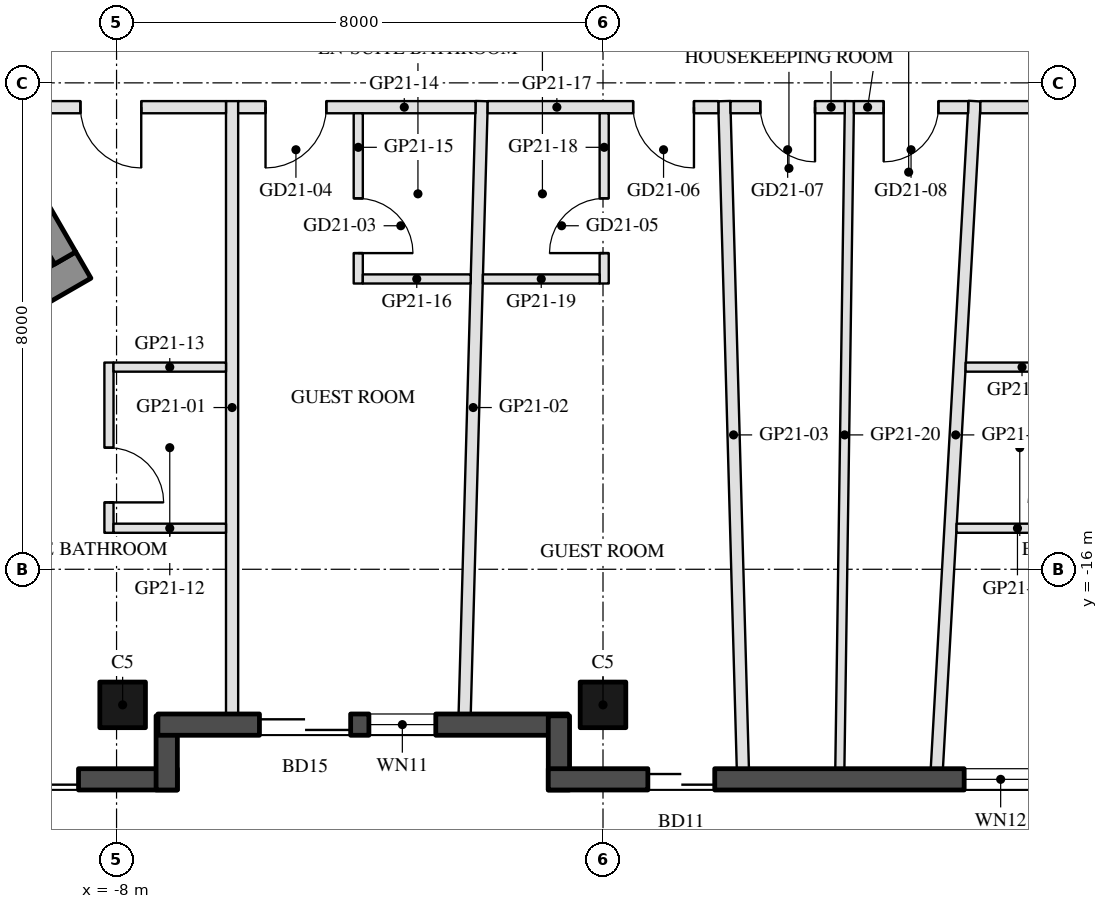
"""IFC4 building model, lengths in metres.
Left out: names, types, materials, properties, quantities, classifications, styles, units other than length and angle.
Written with IfcOpenShell. Run it as: python <this file> out.ifc"""

import sys

from ifc_helpers import new_model, si_unit, direction, frame, frame_2d, origin, origin_2d, place, context, subcontext, project, spatial, rectangle, hollow_rectangle, extrude, element, fill, save


model = new_model("IFC4")
c1 = context("Model", 3, precision=1e-05, world=origin(), true_north=direction((0.0, 1.0)))
c2 = subcontext(c1, "Body", "Model", "MODEL_VIEW")
j1 = project(units=[si_unit("LENGTHUNIT", "METRE"), si_unit("PLANEANGLEUNIT", "RADIAN")], contexts=[c1])
p1 = place(None, origin())
s1 = spatial("IfcSite", under=j1, at=p1, CompositionType="ELEMENT")
p2 = place(p1, origin())
s2 = spatial("IfcBuilding", under=s1, at=p2, CompositionType="ELEMENT")
p3 = place(p2, frame((0.0, 0.0, 216.9)))
s3 = spatial("IfcBuildingStorey", under=s2, at=p3, CompositionType="ELEMENT", Elevation=216.9)
for number, where, z_axis, x_axis in (
    (1, (-7.9, -18.23, 0.0), (0.0, 0.0, 1.0), (-1.0, 0.0, 0.0)),
    (2, (0.0, -18.23, 0.0), (0.0, 0.0, 1.0), (-1.0, 0.0, 0.0)),
):
    element("IfcColumn", number, at=place(p3, frame(where, z_axis=z_axis, x_axis=x_axis)), inside=s3, PredefinedType="COLUMN", context=c2, shape_type="SweptSolid", body=[
        extrude(hollow_rectangle(XDim=0.75, YDim=0.75, WallThickness=0.035, at=origin_2d()), origin(), (0.0, 0.0, 1.0), 3.7),
    ])
p4 = place(p3, frame((-18.816, -19.455, 0.0), z_axis=(0.0, 0.0, 1.0), x_axis=(1.0, 0.0, 0.0)))
e3 = element("IfcWall", 3, at=p4, inside=s3, PredefinedType="SOLIDWALL", context=c2, shape_type="SweptSolid", body=[
    extrude(rectangle(XDim=11.816, YDim=0.35, at=frame_2d((5.908, 0.0))), origin(), (0.0, 0.0, 1.0), 3.55),
])
p5 = place(p4, frame((0.381, 0.0, 0.3)))
e4 = element("IfcOpeningElement", 4, at=p5, cuts=e3, PredefinedType="OPENING", context=c2, shape_type="SweptSolid", body=[
    extrude(rectangle(XDim=1.9, YDim=2.65, at=frame_2d((0.95, 1.325))), frame((0.0, 0.185, 0.0), z_axis=(0.0, -1.0, 0.0), x_axis=(1.0, 0.0, 0.0)), (0.0, 0.0, 1.0), 0.37),
])
p6 = place(p4, frame((7.79, 0.0, 0.0)))
e5 = element("IfcOpeningElement", 5, at=p6, cuts=e3, PredefinedType="OPENING", context=c2, shape_type="SweptSolid", body=[
    extrude(rectangle(XDim=2.4, YDim=2.4, at=frame_2d((1.2, 1.2))), frame((0.0, 0.185, 0.0), z_axis=(0.0, -1.0, 0.0), x_axis=(1.0, 0.0, 0.0)), (0.0, 0.0, 1.0), 0.37),
])
p7 = place(p4, frame((3.741, 0.0, 0.3)))
e6 = element("IfcOpeningElement", 6, at=p7, cuts=e3, PredefinedType="OPENING", context=c2, shape_type="SweptSolid", body=[
    extrude(rectangle(XDim=1.7, YDim=2.65, at=frame_2d((0.85, 1.325))), frame((0.0, 0.185, 0.0), z_axis=(0.0, -1.0, 0.0), x_axis=(1.0, 0.0, 0.0)), (0.0, 0.0, 1.0), 0.37),
])
p8 = place(p4, frame((5.741, 0.0, 0.3)))
e7 = element("IfcOpeningElement", 7, at=p8, cuts=e3, PredefinedType="OPENING", context=c2, shape_type="SweptSolid", body=[
    extrude(rectangle(XDim=1.7, YDim=2.65, at=frame_2d((0.85, 1.325))), frame((0.0, 0.185, 0.0), z_axis=(0.0, -1.0, 0.0), x_axis=(1.0, 0.0, 0.0)), (0.0, 0.0, 1.0), 0.37),
])
p9 = place(p3, frame((-7.175, -19.63, 0.0), z_axis=(0.0, 0.0, 1.0), x_axis=(0.0, 1.0, 0.0)))
e8 = element("IfcWall", 8, at=p9, inside=s3, PredefinedType="SOLIDWALL", context=c2, shape_type="SweptSolid", body=[
    extrude(rectangle(XDim=1.22, YDim=0.35, at=frame_2d((0.61, 0.0))), origin(), (0.0, 0.0, 1.0), 3.55),
])
p10 = place(p3, frame((-7.32, -18.555, 0.0), z_axis=(0.0, 0.0, 1.0), x_axis=(1.0, 0.0, 0.0)))
e9 = element("IfcWall", 9, at=p10, inside=s3, PredefinedType="SOLIDWALL", context=c2, shape_type="SweptSolid", body=[
    extrude(rectangle(XDim=6.74, YDim=0.35, at=frame_2d((3.37, 0.0))), origin(), (0.0, 0.0, 1.0), 3.55),
])
p11 = place(p10, frame((1.67, 0.0, 0.0)))
e10 = element("IfcOpeningElement", 10, at=p11, cuts=e9, PredefinedType="OPENING", context=c2, shape_type="SweptSolid", body=[
    extrude(rectangle(XDim=1.5, YDim=2.4, at=frame_2d((0.75, 1.2))), frame((0.0, 0.185, 0.0), z_axis=(0.0, -1.0, 0.0), x_axis=(1.0, 0.0, 0.0)), (0.0, 0.0, 1.0), 0.37),
])
p12 = place(p10, frame((3.47, 0.0, 0.3)))
e11 = element("IfcOpeningElement", 11, at=p12, cuts=e9, PredefinedType="OPENING", context=c2, shape_type="SweptSolid", body=[
    extrude(rectangle(XDim=1.1, YDim=2.65, at=frame_2d((0.55, 1.325))), frame((0.0, 0.185, 0.0), z_axis=(0.0, -1.0, 0.0), x_axis=(1.0, 0.0, 0.0)), (0.0, 0.0, 1.0), 0.37),
])
p13 = place(p3, frame((-0.725, -18.41, 0.0), z_axis=(0.0, 0.0, 1.0), x_axis=(0.0, -1.0, 0.0)))
e12 = element("IfcWall", 12, at=p13, inside=s3, PredefinedType="SOLIDWALL", context=c2, shape_type="SweptSolid", body=[
    extrude(rectangle(XDim=1.22, YDim=0.35, at=frame_2d((0.61, 0.0))), origin(), (0.0, 0.0, 1.0), 3.55),
])
p14 = place(p3, frame((-0.9, -19.455, 0.0), z_axis=(0.0, 0.0, 1.0), x_axis=(1.0, 0.0, 0.0)))
e13 = element("IfcWall", 13, at=p14, inside=s3, PredefinedType="SOLIDWALL", context=c2, shape_type="SweptSolid", body=[
    extrude(rectangle(XDim=9.7, YDim=0.35, at=frame_2d((4.85, 0.0))), origin(), (0.0, 0.0, 1.0), 3.55),
])
p15 = place(p14, frame((1.638, 0.0, 0.0)))
e14 = element("IfcOpeningElement", 14, at=p15, cuts=e13, PredefinedType="OPENING", context=c2, shape_type="SweptSolid", body=[
    extrude(rectangle(XDim=1.1, YDim=2.4, at=frame_2d((0.55, 1.2))), frame((0.0, 0.185, 0.0), z_axis=(0.0, -1.0, 0.0), x_axis=(1.0, 0.0, 0.0)), (0.0, 0.0, 1.0), 0.37),
])
p16 = place(p14, frame((6.84, 0.0, 0.3)))
e15 = element("IfcOpeningElement", 15, at=p16, cuts=e13, PredefinedType="OPENING", context=c2, shape_type="SweptSolid", body=[
    extrude(rectangle(XDim=1.2, YDim=2.65, at=frame_2d((0.6, 1.325))), frame((0.0, 0.185, 0.0), z_axis=(0.0, -1.0, 0.0), x_axis=(1.0, 0.0, 0.0)), (0.0, 0.0, 1.0), 0.37),
])
p17 = place(p3, frame((-8.547, -10.997, 0.0), z_axis=(0.0, 0.0, 1.0), x_axis=(-0.866025009528, -0.500000682871, 0.0)))
e16 = element("IfcWall", 16, at=p17, inside=s3, PredefinedType="SHEAR", context=c2, shape_type="SweptSolid", body=[
    extrude(rectangle(XDim=14.837, YDim=0.5, at=frame_2d((7.418, 0.0))), origin(), (0.0, 0.0, 1.0), 3.5),
])
p18 = place(p3, frame((-13.845, -2.22, 0.0), z_axis=(0.0, 0.0, 1.0), x_axis=(0.500004234368, -0.866022959057, 0.0)))
e17 = element("IfcWall", 17, at=p18, inside=s3, PredefinedType="SHEAR", context=c2, shape_type="SweptSolid", body=[
    extrude(rectangle(XDim=10.0, YDim=0.4, at=frame_2d((5.0, 0.0))), origin(), (0.0, 0.0, 1.0), 3.5),
])
p19 = place(p18, frame((3.55, 0.0, 0.0)))
e18 = element("IfcOpeningElement", 18, at=p19, cuts=e17, PredefinedType="OPENING", context=c2, shape_type="SweptSolid", body=[
    extrude(rectangle(XDim=1.1, YDim=2.1, at=frame_2d((0.55, 1.05))), frame((0.0, 0.21, 0.0), z_axis=(0.0, -1.0, 0.0), x_axis=(1.0, 0.0, 0.0)), (0.0, 0.0, 1.0), 0.42),
])
p20 = place(p18, frame((5.85, 0.0, 0.0)))
e19 = element("IfcOpeningElement", 19, at=p20, cuts=e17, PredefinedType="OPENING", context=c2, shape_type="SweptSolid", body=[
    extrude(rectangle(XDim=1.4, YDim=2.1, at=frame_2d((0.7, 1.05))), frame((0.0, 0.21, 0.0), z_axis=(0.0, -1.0, 0.0), x_axis=(1.0, 0.0, 0.0)), (0.0, 0.0, 1.0), 0.42),
])
p21 = place(p3, frame((-6.1, -18.38, 0.0), z_axis=(0.0, 0.0, 1.0), x_axis=(0.0, 1.0, 0.0)))
e20 = element("IfcWall", 20, at=p21, inside=s3, PredefinedType="PARTITIONING", context=c2, shape_type="SweptSolid", body=[
    extrude(rectangle(XDim=10.08, YDim=0.2, at=frame_2d((5.04, 0.0))), origin(), (0.0, 0.0, 1.0), 3.06),
])
p22 = place(p3, frame((-2.275, -18.38, 0.0), z_axis=(0.0, 0.0, 1.0), x_axis=(0.027818812611, 0.999612981941, 0.0)))
e21 = element("IfcWall", 21, at=p22, inside=s3, PredefinedType="PARTITIONING", context=c2, shape_type="SweptSolid", body=[
    extrude(rectangle(XDim=10.084, YDim=0.2, at=frame_2d((5.042, 0.0))), origin(), (0.0, 0.0, 1.0), 3.06),
])
p23 = place(p3, frame((2.3, -19.28, 0.0), z_axis=(0.0, 0.0, 1.0), x_axis=(-0.027827525898, 0.999612739416, 0.0)))
e22 = element("IfcWall", 22, at=p23, inside=s3, PredefinedType="PARTITIONING", context=c2, shape_type="SweptSolid", body=[
    extrude(rectangle(XDim=10.984, YDim=0.2, at=frame_2d((5.492, 0.0))), origin(), (0.0, 0.0, 1.0), 3.06),
])
p24 = place(p3, frame((5.49, -19.28, 0.0), z_axis=(0.0, 0.0, 1.0), x_axis=(0.056497863711, 0.998402720046, 0.0)))
e23 = element("IfcWall", 23, at=p24, inside=s3, PredefinedType="PARTITIONING", context=c2, shape_type="SweptSolid", body=[
    extrude(rectangle(XDim=10.998, YDim=0.2, at=frame_2d((5.499, 0.0))), origin(), (0.0, 0.0, 1.0), 3.06),
])
p25 = place(p3, frame((-6.2, -8.4, 0.0), z_axis=(0.0, 0.0, 1.0), x_axis=(-1.0, 0.0, 0.0)))
e24 = element("IfcWall", 24, at=p25, inside=s3, PredefinedType="PARTITIONING", context=c2, shape_type="SweptSolid", body=[
    extrude(rectangle(XDim=3.788, YDim=0.2, at=frame_2d((1.894, 0.0))), origin(), (0.0, 0.0, 1.0), 2.95),
])
p26 = place(p25, frame((1.394, 0.0, 0.0)))
e25 = element("IfcOpeningElement", 25, at=p26, cuts=e24, PredefinedType="OPENING", context=c2, shape_type="SweptSolid", body=[
    extrude(rectangle(XDim=1.0, YDim=2.1, at=frame_2d((0.5, 1.05))), frame((0.0, 0.11, 0.0), z_axis=(0.0, -1.0, 0.0), x_axis=(1.0, 0.0, 0.0)), (0.0, 0.0, 1.0), 0.22),
])
p27 = place(p3, frame((-8.125, -12.6, 0.0), z_axis=(0.0, 0.0, 1.0), x_axis=(0.0, -1.0, 0.0)))
e26 = element("IfcWall", 26, at=p27, inside=s3, PredefinedType="PARTITIONING", context=c2, shape_type="SweptSolid", body=[
    extrude(rectangle(XDim=2.8, YDim=0.15, at=frame_2d((1.4, 0.0))), origin(), (0.0, 0.0, 1.0), 3.55),
])
p28 = place(p27, frame((1.4, 0.0, 0.0)))
e27 = element("IfcOpeningElement", 27, at=p28, cuts=e26, PredefinedType="OPENING", context=c2, shape_type="SweptSolid", body=[
    extrude(rectangle(XDim=0.9, YDim=2.1, at=frame_2d((0.45, 1.05))), frame((0.0, 0.085, 0.0), z_axis=(0.0, -1.0, 0.0), x_axis=(1.0, 0.0, 0.0)), (0.0, 0.0, 1.0), 0.17),
])
for number, where, z_axis, x_axis in (
    (28, (-8.05, -15.325, 0.0), (0.0, 0.0, 1.0), (1.0, 0.0, 0.0)),
    (29, (-8.05, -12.675, 0.0), (0.0, 0.0, 1.0), (1.0, 0.0, 0.0)),
):
    element("IfcWall", number, at=place(p3, frame(where, z_axis=z_axis, x_axis=x_axis)), inside=s3, PredefinedType="PARTITIONING", context=c2, shape_type="SweptSolid", body=[
        extrude(rectangle(XDim=1.85, YDim=0.15, at=frame_2d((0.925, 0.0))), origin(), (0.0, 0.0, 1.0), 2.95),
    ])
p29 = place(p3, frame((-2.097, -8.4, 0.0), z_axis=(0.0, 0.0, 1.0), x_axis=(-1.0, 0.0, 0.0)))
e30 = element("IfcWall", 30, at=p29, inside=s3, PredefinedType="PARTITIONING", context=c2, shape_type="SweptSolid", body=[
    extrude(rectangle(XDim=3.903, YDim=0.2, at=frame_2d((1.951, 0.0))), origin(), (0.0, 0.0, 1.0), 2.95),
])
p30 = place(p29, frame((2.453, 0.0, 0.0)))
e31 = element("IfcOpeningElement", 31, at=p30, cuts=e30, PredefinedType="OPENING", context=c2, shape_type="SweptSolid", body=[
    extrude(rectangle(XDim=1.0, YDim=2.1, at=frame_2d((0.5, 1.05))), frame((0.0, 0.11, 0.0), z_axis=(0.0, -1.0, 0.0), x_axis=(1.0, 0.0, 0.0)), (0.0, 0.0, 1.0), 0.22),
])
p31 = place(p3, frame((-4.025, -8.5, 0.0), z_axis=(0.0, 0.0, 1.0), x_axis=(0.0, -1.0, 0.0)))
e32 = element("IfcWall", 32, at=p31, inside=s3, PredefinedType="PARTITIONING", context=c2, shape_type="SweptSolid", body=[
    extrude(rectangle(XDim=2.8, YDim=0.15, at=frame_2d((1.4, 0.0))), origin(), (0.0, 0.0, 1.0), 2.95),
])
p32 = place(p31, frame((1.4, 0.0, 0.0)))
e33 = element("IfcOpeningElement", 33, at=p32, cuts=e32, PredefinedType="OPENING", context=c2, shape_type="SweptSolid", body=[
    extrude(rectangle(XDim=0.9, YDim=2.1, at=frame_2d((0.45, 1.05))), frame((0.0, 0.085, 0.0), z_axis=(0.0, -1.0, 0.0), x_axis=(1.0, 0.0, 0.0)), (0.0, 0.0, 1.0), 0.17),
])
p33 = place(p3, frame((-3.95, -11.225, 0.0), z_axis=(0.0, 0.0, 1.0), x_axis=(1.0, 0.0, 0.0)))
e34 = element("IfcWall", 34, at=p33, inside=s3, PredefinedType="PARTITIONING", context=c2, shape_type="SweptSolid", body=[
    extrude(rectangle(XDim=1.774, YDim=0.15, at=frame_2d((0.887, 0.0))), origin(), (0.0, 0.0, 1.0), 2.95),
])
p34 = place(p3, frame((1.897, -8.4, 0.0), z_axis=(0.0, 0.0, 1.0), x_axis=(-1.0, 0.0, 0.0)))
e35 = element("IfcWall", 35, at=p34, inside=s3, PredefinedType="PARTITIONING", context=c2, shape_type="SweptSolid", body=[
    extrude(rectangle(XDim=3.794, YDim=0.2, at=frame_2d((1.897, 0.0))), origin(), (0.0, 0.0, 1.0), 2.95),
])
p35 = place(p34, frame((0.401, 0.0, 0.0)))
e36 = element("IfcOpeningElement", 36, at=p35, cuts=e35, PredefinedType="OPENING", context=c2, shape_type="SweptSolid", body=[
    extrude(rectangle(XDim=1.0, YDim=2.1, at=frame_2d((0.5, 1.05))), frame((0.0, 0.11, 0.0), z_axis=(0.0, -1.0, 0.0), x_axis=(1.0, 0.0, 0.0)), (0.0, 0.0, 1.0), 0.22),
])
p36 = place(p3, frame((0.019, -11.3, 0.0), z_axis=(0.0, 0.0, 1.0), x_axis=(0.0, 1.0, 0.0)))
e37 = element("IfcWall", 37, at=p36, inside=s3, PredefinedType="PARTITIONING", context=c2, shape_type="SweptSolid", body=[
    extrude(rectangle(XDim=2.8, YDim=0.15, at=frame_2d((1.4, 0.0))), origin(), (0.0, 0.0, 1.0), 2.95),
])
p37 = place(p36, frame((0.5, 0.0, 0.0)))
e38 = element("IfcOpeningElement", 38, at=p37, cuts=e37, PredefinedType="OPENING", context=c2, shape_type="SweptSolid", body=[
    extrude(rectangle(XDim=0.9, YDim=2.1, at=frame_2d((0.45, 1.05))), frame((0.0, 0.085, 0.0), z_axis=(0.0, -1.0, 0.0), x_axis=(1.0, 0.0, 0.0)), (0.0, 0.0, 1.0), 0.17),
])
p38 = place(p3, frame((-1.976, -11.225, 0.0), z_axis=(0.0, 0.0, 1.0), x_axis=(1.0, 0.0, 0.0)))
e39 = element("IfcWall", 39, at=p38, inside=s3, PredefinedType="PARTITIONING", context=c2, shape_type="SweptSolid", body=[
    extrude(rectangle(XDim=1.92, YDim=0.15, at=frame_2d((0.96, 0.0))), origin(), (0.0, 0.0, 1.0), 2.95),
])
p39 = place(p3, frame((3.895, -19.28, 0.0), z_axis=(0.0, 0.0, 1.0), x_axis=(0.014384601302, 0.99989653627, 0.0)))
e40 = element("IfcWall", 40, at=p39, inside=s3, PredefinedType="PARTITIONING", context=c2, shape_type="SweptSolid", body=[
    extrude(rectangle(XDim=10.981, YDim=0.15, at=frame_2d((5.491, 0.0))), origin(), (0.0, 0.0, 1.0), 2.95),
])
p40 = place(p3, frame((3.976, -8.4, 0.0), z_axis=(0.0, 0.0, 1.0), x_axis=(-1.0, 0.0, 0.0)))
e41 = element("IfcWall", 41, at=p40, inside=s3, PredefinedType="PARTITIONING", context=c2, shape_type="SweptSolid", body=[
    extrude(rectangle(XDim=1.879, YDim=0.2, at=frame_2d((0.939, 0.0))), origin(), (0.0, 0.0, 1.0), 2.95),
])
p41 = place(p40, frame((0.49, 0.0, 0.0)))
e42 = element("IfcOpeningElement", 42, at=p41, cuts=e41, PredefinedType="OPENING", context=c2, shape_type="SweptSolid", body=[
    extrude(rectangle(XDim=0.9, YDim=2.1, at=frame_2d((0.45, 1.05))), frame((0.0, 0.11, 0.0), z_axis=(0.0, -1.0, 0.0), x_axis=(1.0, 0.0, 0.0)), (0.0, 0.0, 1.0), 0.22),
])
p42 = place(p3, frame((6.006, -8.4, 0.0), z_axis=(0.0, 0.0, 1.0), x_axis=(-1.0, 0.0, 0.0)))
e43 = element("IfcWall", 43, at=p42, inside=s3, PredefinedType="PARTITIONING", context=c2, shape_type="SweptSolid", body=[
    extrude(rectangle(XDim=1.879, YDim=0.2, at=frame_2d((0.939, 0.0))), origin(), (0.0, 0.0, 1.0), 3.55),
])
p43 = place(p42, frame((0.49, 0.0, 0.0)))
e44 = element("IfcOpeningElement", 44, at=p43, cuts=e43, PredefinedType="OPENING", context=c2, shape_type="SweptSolid", body=[
    extrude(rectangle(XDim=0.9, YDim=2.1, at=frame_2d((0.45, 1.05))), frame((0.0, 0.11, 0.0), z_axis=(0.0, -1.0, 0.0), x_axis=(1.0, 0.0, 0.0)), (0.0, 0.0, 1.0), 0.22),
])
p44 = place(p3, frame((9.988, -8.4, 0.0), z_axis=(0.0, 0.0, 1.0), x_axis=(-1.0, 0.0, 0.0)))
e45 = element("IfcWall", 45, at=p44, inside=s3, PredefinedType="PARTITIONING", context=c2, shape_type="SweptSolid", body=[
    extrude(rectangle(XDim=3.782, YDim=0.2, at=frame_2d((1.891, 0.0))), origin(), (0.0, 0.0, 1.0), 2.95),
])
p45 = place(p44, frame((1.391, 0.0, 0.0)))
e46 = element("IfcOpeningElement", 46, at=p45, cuts=e45, PredefinedType="OPENING", context=c2, shape_type="SweptSolid", body=[
    extrude(rectangle(XDim=1.0, YDim=2.1, at=frame_2d((0.5, 1.05))), frame((0.0, 0.11, 0.0), z_axis=(0.0, -1.0, 0.0), x_axis=(1.0, 0.0, 0.0)), (0.0, 0.0, 1.0), 0.22),
])
p46 = place(p3, frame((5.814, -15.325, 0.0), z_axis=(0.0, 0.0, 1.0), x_axis=(1.0, 0.0, 0.0)))
e47 = element("IfcWall", 47, at=p46, inside=s3, PredefinedType="PARTITIONING", context=c2, shape_type="SweptSolid", body=[
    extrude(rectangle(XDim=2.004, YDim=0.15, at=frame_2d((1.002, 0.0))), origin(), (0.0, 0.0, 1.0), 2.95),
])
p47 = place(p3, frame((5.964, -12.675, 0.0), z_axis=(0.0, 0.0, 1.0), x_axis=(1.0, 0.0, 0.0)))
e48 = element("IfcWall", 48, at=p47, inside=s3, PredefinedType="PARTITIONING", context=c2, shape_type="SweptSolid", body=[
    extrude(rectangle(XDim=1.854, YDim=0.15, at=frame_2d((0.927, 0.0))), origin(), (0.0, 0.0, 1.0), 2.95),
])
p48 = place(p6, frame((2.4, 0.0, 0.0), z_axis=(0.0, 0.0, 1.0), x_axis=(-1.0, 0.0, 0.0)))
e49 = element("IfcDoor", 49, at=p48, inside=s3, OperationType="SLIDING_TO_LEFT", PredefinedType="DOOR", context=c2, shape_type="SweptSolid", body=[
    extrude(rectangle(XDim=2.4, YDim=2.4, at=frame_2d((1.2, 1.2))), frame((0.0, 0.025, 0.0), z_axis=(0.0, -1.0, 0.0), x_axis=(1.0, 0.0, 0.0)), (0.0, 0.0, 1.0), 0.05),
])
fill(e5, e49)
p49 = place(p11, frame((1.5, 0.0, 0.0), z_axis=(0.0, 0.0, 1.0), x_axis=(-1.0, 0.0, 0.0)))
e50 = element("IfcDoor", 50, at=p49, inside=s3, OperationType="SLIDING_TO_LEFT", PredefinedType="DOOR", context=c2, shape_type="SweptSolid", body=[
    extrude(rectangle(XDim=1.5, YDim=2.4, at=frame_2d((0.75, 1.2))), frame((0.0, 0.025, 0.0), z_axis=(0.0, -1.0, 0.0), x_axis=(1.0, 0.0, 0.0)), (0.0, 0.0, 1.0), 0.05),
])
fill(e10, e50)
p50 = place(p12, origin())
e51 = element("IfcWindow", 51, at=p50, inside=s3, PartitioningType="SINGLE_PANEL", PredefinedType="WINDOW", context=c2, shape_type="SweptSolid", body=[
    extrude(rectangle(XDim=1.1, YDim=2.65, at=frame_2d((0.55, 1.325))), frame((0.0, 0.03, 0.0), z_axis=(0.0, -1.0, 0.0), x_axis=(1.0, 0.0, 0.0)), (0.0, 0.0, 1.0), 0.06),
])
fill(e11, e51)
p51 = place(p15, frame((1.1, 0.0, 0.0), z_axis=(0.0, 0.0, 1.0), x_axis=(-1.0, 0.0, 0.0)))
e52 = element("IfcDoor", 52, at=p51, inside=s3, OperationType="SLIDING_TO_LEFT", PredefinedType="DOOR", context=c2, shape_type="SweptSolid", body=[
    extrude(rectangle(XDim=1.1, YDim=2.4, at=frame_2d((0.55, 1.2))), frame((0.0, 0.025, 0.0), z_axis=(0.0, -1.0, 0.0), x_axis=(1.0, 0.0, 0.0)), (0.0, 0.0, 1.0), 0.05),
])
fill(e14, e52)
p52 = place(p16, origin())
e53 = element("IfcWindow", 53, at=p52, inside=s3, PartitioningType="SINGLE_PANEL", PredefinedType="WINDOW", context=c2, shape_type="SweptSolid", body=[
    extrude(rectangle(XDim=1.2, YDim=2.65, at=frame_2d((0.6, 1.325))), frame((0.0, 0.03, 0.0), z_axis=(0.0, -1.0, 0.0), x_axis=(1.0, 0.0, 0.0)), (0.0, 0.0, 1.0), 0.06),
])
fill(e15, e53)
p53 = place(p28, origin())
e54 = element("IfcDoor", 54, at=p53, inside=s3, OperationType="SINGLE_SWING_RIGHT", PredefinedType="DOOR", context=c2, shape_type="SweptSolid", body=[
    extrude(rectangle(XDim=0.9, YDim=2.1, at=frame_2d((0.45, 1.05))), frame((0.0, 0.025, 0.0), z_axis=(0.0, -1.0, 0.0), x_axis=(1.0, 0.0, 0.0)), (0.0, 0.0, 1.0), 0.05),
])
fill(e27, e54)
p54 = place(p26, origin())
e55 = element("IfcDoor", 55, at=p54, inside=s3, OperationType="SINGLE_SWING_LEFT", PredefinedType="DOOR", context=c2, shape_type="SweptSolid", body=[
    extrude(rectangle(XDim=1.0, YDim=2.1, at=frame_2d((0.5, 1.05))), frame((0.0, 0.025, 0.0), z_axis=(0.0, -1.0, 0.0), x_axis=(1.0, 0.0, 0.0)), (0.0, 0.0, 1.0), 0.05),
])
fill(e25, e55)
p55 = place(p32, origin())
e56 = element("IfcDoor", 56, at=p55, inside=s3, OperationType="SINGLE_SWING_RIGHT", PredefinedType="DOOR", context=c2, shape_type="SweptSolid", body=[
    extrude(rectangle(XDim=0.9, YDim=2.1, at=frame_2d((0.45, 1.05))), frame((0.0, 0.025, 0.0), z_axis=(0.0, -1.0, 0.0), x_axis=(1.0, 0.0, 0.0)), (0.0, 0.0, 1.0), 0.05),
])
fill(e33, e56)
p56 = place(p30, origin())
e57 = element("IfcDoor", 57, at=p56, inside=s3, OperationType="SINGLE_SWING_RIGHT", PredefinedType="DOOR", context=c2, shape_type="SweptSolid", body=[
    extrude(rectangle(XDim=1.0, YDim=2.1, at=frame_2d((0.5, 1.05))), frame((0.0, 0.025, 0.0), z_axis=(0.0, -1.0, 0.0), x_axis=(1.0, 0.0, 0.0)), (0.0, 0.0, 1.0), 0.05),
])
fill(e31, e57)
p57 = place(p37, origin())
e58 = element("IfcDoor", 58, at=p57, inside=s3, OperationType="SINGLE_SWING_LEFT", PredefinedType="DOOR", context=c2, shape_type="SweptSolid", body=[
    extrude(rectangle(XDim=0.9, YDim=2.1, at=frame_2d((0.45, 1.05))), frame((0.0, 0.025, 0.0), z_axis=(0.0, -1.0, 0.0), x_axis=(1.0, 0.0, 0.0)), (0.0, 0.0, 1.0), 0.05),
])
fill(e38, e58)
p58 = place(p35, origin())
e59 = element("IfcDoor", 59, at=p58, inside=s3, OperationType="SINGLE_SWING_LEFT", PredefinedType="DOOR", context=c2, shape_type="SweptSolid", body=[
    extrude(rectangle(XDim=1.0, YDim=2.1, at=frame_2d((0.5, 1.05))), frame((0.0, 0.025, 0.0), z_axis=(0.0, -1.0, 0.0), x_axis=(1.0, 0.0, 0.0)), (0.0, 0.0, 1.0), 0.05),
])
fill(e36, e59)
p59 = place(p41, origin())
e60 = element("IfcDoor", 60, at=p59, inside=s3, OperationType="SINGLE_SWING_LEFT", PredefinedType="DOOR", context=c2, shape_type="SweptSolid", body=[
    extrude(rectangle(XDim=0.9, YDim=2.1, at=frame_2d((0.45, 1.05))), frame((0.0, 0.025, 0.0), z_axis=(0.0, -1.0, 0.0), x_axis=(1.0, 0.0, 0.0)), (0.0, 0.0, 1.0), 0.05),
])
fill(e42, e60)
p60 = place(p43, origin())
e61 = element("IfcDoor", 61, at=p60, inside=s3, OperationType="SINGLE_SWING_RIGHT", PredefinedType="DOOR", context=c2, shape_type="SweptSolid", body=[
    extrude(rectangle(XDim=0.9, YDim=2.1, at=frame_2d((0.45, 1.05))), frame((0.0, 0.025, 0.0), z_axis=(0.0, -1.0, 0.0), x_axis=(1.0, 0.0, 0.0)), (0.0, 0.0, 1.0), 0.05),
])
fill(e44, e61)
save(model, sys.argv[1])
